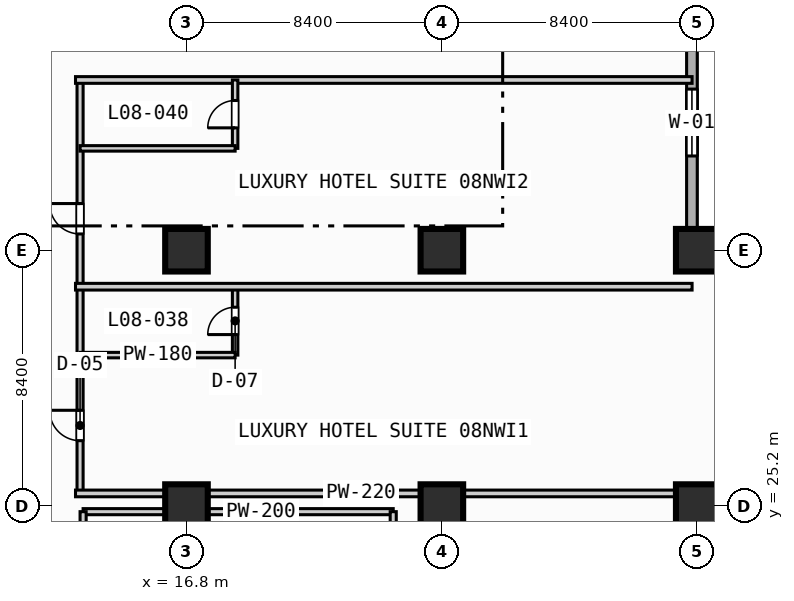
"""IFC4 building model, lengths in metres.
Left out: names, types, materials, properties, quantities, classifications, styles, units other than length and angle.
Written with IfcOpenShell. Run it as: python <this file> out.ifc"""

import sys

from ifc_helpers import new_model, si_unit, direction, frame, frame_2d, origin, origin_2d, place, context, subcontext, project, spatial, rectangle, extrude, element, fill, save


model = new_model("IFC4")
c1 = context("Model", 3, precision=1e-05, world=origin(), true_north=direction((0.0, 1.0)))
c2 = subcontext(c1, "Body", "Model", "MODEL_VIEW")
j1 = project(units=[si_unit("LENGTHUNIT", "METRE"), si_unit("PLANEANGLEUNIT", "RADIAN")], contexts=[c1])
p1 = place(None, origin())
s1 = spatial("IfcSite", under=j1, at=p1, CompositionType="ELEMENT")
p2 = place(p1, origin())
s2 = spatial("IfcBuilding", under=s1, at=p2, CompositionType="ELEMENT")
p3 = place(p2, frame((0.0, 0.0, 39.6)))
s3 = spatial("IfcBuildingStorey", under=s2, at=p3, CompositionType="ELEMENT", Elevation=39.6)
for number, where, z_axis, x_axis in (
    (1, (16.8, 25.2, 0.0), (0.0, 0.0, 1.0), (1.0, 0.0, 0.0)),
    (2, (16.8, 33.6, 0.0), (0.0, 0.0, 1.0), (1.0, 0.0, 0.0)),
    (3, (25.2, 25.2, 0.0), (0.0, 0.0, 1.0), (1.0, 0.0, 0.0)),
    (4, (25.2, 33.6, 0.0), (0.0, 0.0, 1.0), (1.0, 0.0, 0.0)),
    (5, (33.6, 25.2, 0.0), (0.0, 0.0, 1.0), (1.0, 0.0, 0.0)),
    (6, (33.6, 33.6, 0.0), (0.0, 0.0, 1.0), (1.0, 0.0, 0.0)),
):
    element("IfcColumn", number, at=place(p3, frame(where, z_axis=z_axis, x_axis=x_axis)), inside=s3, PredefinedType="COLUMN", context=c2, shape_type="SweptSolid", body=[
        extrude(rectangle(XDim=1.4, YDim=1.4, at=origin_2d()), origin(), (0.0, 0.0, 1.0), 3.8),
    ])
p4 = place(p3, frame((33.425, 89.225, 0.0), z_axis=(0.0, 0.0, 1.0), x_axis=(0.0, -1.0, 0.0)))
e7 = element("IfcWall", 7, at=p4, inside=s3, PredefinedType="STANDARD", context=c2, shape_type="SweptSolid", body=[
    extrude(rectangle(XDim=55.8, YDim=0.35, at=frame_2d((27.9, 0.0))), origin(), (0.0, 0.0, 1.0), 3.55),
])
p5 = place(p4, frame((50.325, 0.0, 0.85)))
e8 = element("IfcOpeningElement", 8, at=p5, cuts=e7, PredefinedType="OPENING", context=c2, shape_type="SweptSolid", body=[
    extrude(rectangle(XDim=2.2, YDim=1.8, at=frame_2d((1.1, 0.9))), frame((0.0, 0.185, 0.0), z_axis=(0.0, -1.0, 0.0), x_axis=(1.0, 0.0, 0.0)), (0.0, 0.0, 1.0), 0.37),
])
p6 = place(p3, frame((33.425, 33.425, 0.0), z_axis=(0.0, 0.0, 1.0), x_axis=(1.0, 0.0, 0.0)))
e9 = element("IfcWall", 9, at=p6, inside=s3, PredefinedType="STANDARD", context=c2, shape_type="SweptSolid", body=[
    extrude(rectangle(XDim=55.8, YDim=0.35, at=frame_2d((27.9, 0.0))), origin(), (0.0, 0.0, 1.0), 3.55),
])
p7 = place(p6, frame((12.075, 0.0, 0.0)))
e10 = element("IfcOpeningElement", 10, at=p7, cuts=e9, PredefinedType="OPENING", context=c2, shape_type="SweptSolid", body=[
    extrude(rectangle(XDim=1.4, YDim=2.2, at=frame_2d((0.7, 1.1))), frame((0.0, 0.185, 0.0), z_axis=(0.0, -1.0, 0.0), x_axis=(1.0, 0.0, 0.0)), (0.0, 0.0, 1.0), 0.37),
])
p8 = place(p3, frame((18.6, 13.4, 0.0), z_axis=(0.0, 0.0, 1.0), x_axis=(0.0, 1.0, 0.0)))
e11 = element("IfcWall", 11, at=p8, inside=s3, PredefinedType="PARTITIONING", context=c2, shape_type="SweptSolid", body=[
    extrude(rectangle(XDim=11.6, YDim=0.16, at=frame_2d((5.8, 0.0))), origin(), (0.0, 0.0, 1.0), 3.55),
])
p9 = place(p3, frame((13.4, 25.0, 0.0), z_axis=(0.0, 0.0, 1.0), x_axis=(1.0, 0.0, 0.0)))
e12 = element("IfcWall", 12, at=p9, inside=s3, PredefinedType="PARTITIONING", context=c2, shape_type="SweptSolid", body=[
    extrude(rectangle(XDim=10.2, YDim=0.2, at=frame_2d((5.1, 0.0))), origin(), (0.0, 0.0, 1.0), 2.8),
])
for number, where, z_axis, x_axis in (
    (13, (13.4, 13.4, 0.0), (0.0, 0.0, 1.0), (0.0, 1.0, 0.0)),
    (14, (23.6, 13.4, 0.0), (0.0, 0.0, 1.0), (0.0, 1.0, 0.0)),
):
    element("IfcWall", number, at=place(p3, frame(where, z_axis=z_axis, x_axis=x_axis)), inside=s3, PredefinedType="PARTITIONING", context=c2, shape_type="SweptSolid", body=[
        extrude(rectangle(XDim=11.6, YDim=0.2, at=frame_2d((5.8, 0.0))), origin(), (0.0, 0.0, 1.0), 3.55),
    ])
p10 = place(p3, frame((13.3, 25.6, 0.0), z_axis=(0.0, 0.0, 1.0), x_axis=(0.0, 1.0, 0.0)))
e15 = element("IfcWall", 15, at=p10, inside=s3, PredefinedType="PARTITIONING", context=c2, shape_type="SweptSolid", body=[
    extrude(rectangle(XDim=13.6, YDim=0.2, at=frame_2d((6.8, 0.0))), origin(), (0.0, 0.0, 1.0), 3.55),
])
p11 = place(p10, frame((1.735, 0.0, 0.0)))
e16 = element("IfcOpeningElement", 16, at=p11, cuts=e15, PredefinedType="OPENING", context=c2, shape_type="SweptSolid", body=[
    extrude(rectangle(XDim=1.0, YDim=2.15, at=frame_2d((0.5, 1.075))), frame((0.0, 0.11, 0.0), z_axis=(0.0, -1.0, 0.0), x_axis=(1.0, 0.0, 0.0)), (0.0, 0.0, 1.0), 0.22),
])
p12 = place(p10, frame((8.535, 0.0, 0.0)))
e17 = element("IfcOpeningElement", 17, at=p12, cuts=e15, PredefinedType="OPENING", context=c2, shape_type="SweptSolid", body=[
    extrude(rectangle(XDim=1.0, YDim=2.15, at=frame_2d((0.5, 1.075))), frame((0.0, 0.11, 0.0), z_axis=(0.0, -1.0, 0.0), x_axis=(1.0, 0.0, 0.0)), (0.0, 0.0, 1.0), 0.22),
])
p13 = place(p3, frame((13.15, 25.6, 0.0), z_axis=(0.0, 0.0, 1.0), x_axis=(1.0, 0.0, 0.0)))
e18 = element("IfcWall", 18, at=p13, inside=s3, PredefinedType="PARTITIONING", context=c2, shape_type="SweptSolid", body=[
    extrude(rectangle(XDim=20.28, YDim=0.22, at=frame_2d((10.14, 0.0))), origin(), (0.0, 0.0, 1.0), 3.55),
])
p14 = place(p3, frame((18.4, 30.15, 0.0), z_axis=(0.0, 0.0, 1.0), x_axis=(0.0, 1.0, 0.0)))
e19 = element("IfcWall", 19, at=p14, inside=s3, PredefinedType="PLUMBINGWALL", context=c2, shape_type="SweptSolid", body=[
    extrude(rectangle(XDim=2.25, YDim=0.18, at=frame_2d((1.125, 0.0))), origin(), (0.0, 0.0, 1.0), 3.55),
])
p15 = place(p14, frame((0.675, 0.0, 0.0)))
e20 = element("IfcOpeningElement", 20, at=p15, cuts=e19, PredefinedType="OPENING", context=c2, shape_type="SweptSolid", body=[
    extrude(rectangle(XDim=0.9, YDim=2.1, at=frame_2d((0.45, 1.05))), frame((0.0, 0.1, 0.0), z_axis=(0.0, -1.0, 0.0), x_axis=(1.0, 0.0, 0.0)), (0.0, 0.0, 1.0), 0.2),
])
p16 = place(p3, frame((13.3, 30.15, 0.0), z_axis=(0.0, 0.0, 1.0), x_axis=(1.0, 0.0, 0.0)))
e21 = element("IfcWall", 21, at=p16, inside=s3, PredefinedType="PLUMBINGWALL", context=c2, shape_type="SweptSolid", body=[
    extrude(rectangle(XDim=5.1, YDim=0.18, at=frame_2d((2.55, 0.0))), origin(), (0.0, 0.0, 1.0), 3.55),
])
for number, where, z_axis, x_axis in (
    (22, (13.15, 32.4, 0.0), (0.0, 0.0, 1.0), (1.0, 0.0, 0.0)),
    (23, (13.15, 39.2, 0.0), (0.0, 0.0, 1.0), (1.0, 0.0, 0.0)),
):
    element("IfcWall", number, at=place(p3, frame(where, z_axis=z_axis, x_axis=x_axis)), inside=s3, PredefinedType="PARTITIONING", context=c2, shape_type="SweptSolid", body=[
        extrude(rectangle(XDim=20.28, YDim=0.22, at=frame_2d((10.14, 0.0))), origin(), (0.0, 0.0, 1.0), 3.55),
    ])
p17 = place(p3, frame((18.4, 36.95, 0.0), z_axis=(0.0, 0.0, 1.0), x_axis=(0.0, 1.0, 0.0)))
e24 = element("IfcWall", 24, at=p17, inside=s3, PredefinedType="PLUMBINGWALL", context=c2, shape_type="SweptSolid", body=[
    extrude(rectangle(XDim=2.25, YDim=0.18, at=frame_2d((1.125, 0.0))), origin(), (0.0, 0.0, 1.0), 3.55),
])
p18 = place(p17, frame((0.675, 0.0, 0.0)))
e25 = element("IfcOpeningElement", 25, at=p18, cuts=e24, PredefinedType="OPENING", context=c2, shape_type="SweptSolid", body=[
    extrude(rectangle(XDim=0.9, YDim=2.1, at=frame_2d((0.45, 1.05))), frame((0.0, 0.1, 0.0), z_axis=(0.0, -1.0, 0.0), x_axis=(1.0, 0.0, 0.0)), (0.0, 0.0, 1.0), 0.2),
])
p19 = place(p3, frame((13.3, 36.95, 0.0), z_axis=(0.0, 0.0, 1.0), x_axis=(1.0, 0.0, 0.0)))
e26 = element("IfcWall", 26, at=p19, inside=s3, PredefinedType="PLUMBINGWALL", context=c2, shape_type="SweptSolid", body=[
    extrude(rectangle(XDim=5.1, YDim=0.18, at=frame_2d((2.55, 0.0))), origin(), (0.0, 0.0, 1.0), 3.55),
])
p20 = place(p5, origin())
e27 = element("IfcWindow", 27, at=p20, inside=s3, PartitioningType="SINGLE_PANEL", PredefinedType="WINDOW", context=c2, shape_type="SweptSolid", body=[
    extrude(rectangle(XDim=2.2, YDim=1.8, at=frame_2d((1.1, 0.9))), frame((0.0, 0.03, 0.0), z_axis=(0.0, -1.0, 0.0), x_axis=(1.0, 0.0, 0.0)), (0.0, 0.0, 1.0), 0.06),
])
fill(e8, e27)
p21 = place(p11, origin())
e28 = element("IfcDoor", 28, at=p21, inside=s3, OperationType="SINGLE_SWING_RIGHT", PredefinedType="DOOR", context=c2, shape_type="SweptSolid", body=[
    extrude(rectangle(XDim=1.0, YDim=2.15, at=frame_2d((0.5, 1.075))), frame((0.0, 0.025, 0.0), z_axis=(0.0, -1.0, 0.0), x_axis=(1.0, 0.0, 0.0)), (0.0, 0.0, 1.0), 0.05),
])
fill(e16, e28)
p22 = place(p12, origin())
e29 = element("IfcDoor", 29, at=p22, inside=s3, OperationType="SINGLE_SWING_RIGHT", PredefinedType="DOOR", context=c2, shape_type="SweptSolid", body=[
    extrude(rectangle(XDim=1.0, YDim=2.15, at=frame_2d((0.5, 1.075))), frame((0.0, 0.025, 0.0), z_axis=(0.0, -1.0, 0.0), x_axis=(1.0, 0.0, 0.0)), (0.0, 0.0, 1.0), 0.05),
])
fill(e17, e29)
p23 = place(p15, origin())
e30 = element("IfcDoor", 30, at=p23, inside=s3, OperationType="SINGLE_SWING_LEFT", PredefinedType="DOOR", context=c2, shape_type="SweptSolid", body=[
    extrude(rectangle(XDim=0.9, YDim=2.1, at=frame_2d((0.45, 1.05))), frame((0.0, 0.025, 0.0), z_axis=(0.0, -1.0, 0.0), x_axis=(1.0, 0.0, 0.0)), (0.0, 0.0, 1.0), 0.05),
])
fill(e20, e30)
p24 = place(p18, origin())
e31 = element("IfcDoor", 31, at=p24, inside=s3, OperationType="SINGLE_SWING_LEFT", PredefinedType="DOOR", context=c2, shape_type="SweptSolid", body=[
    extrude(rectangle(XDim=0.9, YDim=2.1, at=frame_2d((0.45, 1.05))), frame((0.0, 0.025, 0.0), z_axis=(0.0, -1.0, 0.0), x_axis=(1.0, 0.0, 0.0)), (0.0, 0.0, 1.0), 0.05),
])
fill(e25, e31)
save(model, sys.argv[1])
